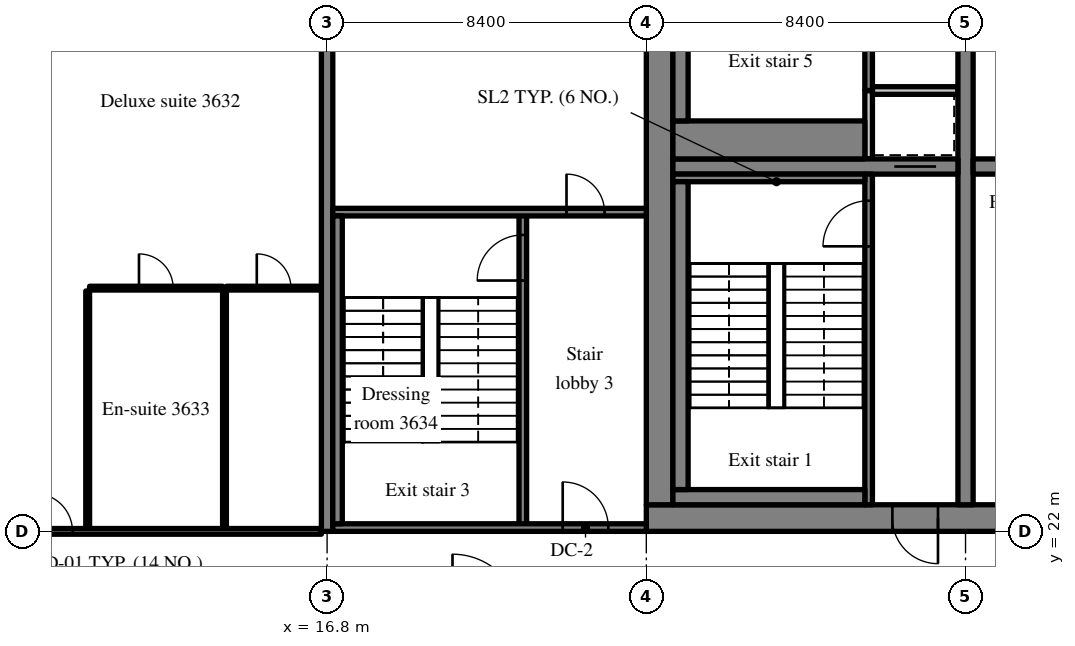
"""IFC4 building model, lengths in metres.
Left out: names, types, materials, properties, quantities, classifications, styles, units other than length and angle.
Written with IfcOpenShell. Run it as: python <this file> out.ifc"""

import sys

from ifc_helpers import new_model, si_unit, direction, frame, frame_2d, origin, place, context, subcontext, project, spatial, rectangle, extrude, source, transform, mapped, element, fill, save


model = new_model("IFC4")
c1 = context("Model", 3, precision=1e-05, world=origin(), true_north=direction((0.0, 1.0)))
c2 = subcontext(c1, "Body", "Model", "MODEL_VIEW")
j1 = project(units=[si_unit("LENGTHUNIT", "METRE"), si_unit("PLANEANGLEUNIT", "RADIAN")], contexts=[c1])
p1 = place(None, origin())
s1 = spatial("IfcSite", under=j1, at=p1, CompositionType="ELEMENT")
p2 = place(p1, origin())
s2 = spatial("IfcBuilding", under=s1, at=p2, CompositionType="ELEMENT")
p3 = place(p2, frame((0.0, 0.0, 151.6)))
s3 = spatial("IfcBuildingStorey", under=s2, at=p3, CompositionType="ELEMENT", Elevation=151.6)
m1 = source(origin(), c2, "Body", "SweptSolid", [
    extrude(rectangle(XDim=50.4, YDim=0.7, at=frame_2d((25.2, 0.0))), origin(), (0.0, 0.0, 1.0), 3.52),
])
p4 = place(p3, frame((25.2, 22.35, 0.0), z_axis=(0.0, 0.0, 1.0), x_axis=(1.0, 0.0, 0.0)))
e1 = element("IfcWall", 1, at=p4, inside=s3, PredefinedType="SHEAR", context=c2, shape_type="MappedRepresentation", body=[
    mapped(m1, transform((0.0, 0.0, 0.0), scale=1.0)),
])
m2 = source(origin(), c2, "Body", "SweptSolid", [
    extrude(rectangle(XDim=1.8, YDim=2.1, at=frame_2d((0.9, 1.05))), frame((0.0, 0.36, 0.0), z_axis=(0.0, -1.0, 0.0), x_axis=(1.0, 0.0, 0.0)), (0.0, 0.0, 1.0), 0.72),
])
p5 = place(p4, frame((15.9, 0.0, 0.0)))
e2 = element("IfcOpeningElement", 2, at=p5, cuts=e1, PredefinedType="OPENING", context=c2, shape_type="MappedRepresentation", body=[
    mapped(m2, transform((0.0, 0.0, 0.0), scale=1.0)),
])
m3 = source(origin(), c2, "Body", "SweptSolid", [
    extrude(rectangle(XDim=0.9, YDim=2.1, at=frame_2d((0.45, 1.05))), frame((0.0, 0.36, 0.0), z_axis=(0.0, -1.0, 0.0), x_axis=(1.0, 0.0, 0.0)), (0.0, 0.0, 1.0), 0.72),
])
p6 = place(p4, frame((21.5, 0.0, 0.0)))
e3 = element("IfcOpeningElement", 3, at=p6, cuts=e1, PredefinedType="OPENING", context=c2, shape_type="MappedRepresentation", body=[
    mapped(m3, transform((0.0, 0.0, 0.0), scale=1.0)),
])
p7 = place(p4, frame((32.7, 0.0, 0.0)))
e4 = element("IfcOpeningElement", 4, at=p7, cuts=e1, PredefinedType="OPENING", context=c2, shape_type="MappedRepresentation", body=[
    mapped(m2, transform((0.0, 0.0, 0.0), scale=1.0)),
])
m4 = source(origin(), c2, "Body", "SweptSolid", [
    extrude(rectangle(XDim=1.2, YDim=2.1, at=frame_2d((0.6, 1.05))), frame((0.0, 0.36, 0.0), z_axis=(0.0, -1.0, 0.0), x_axis=(1.0, 0.0, 0.0)), (0.0, 0.0, 1.0), 0.72),
])
p8 = place(p4, frame((6.475, 0.0, 0.0)))
e5 = element("IfcOpeningElement", 5, at=p8, cuts=e1, PredefinedType="OPENING", context=c2, shape_type="MappedRepresentation", body=[
    mapped(m4, transform((0.0, 0.0, 0.0), scale=1.0)),
])
p9 = place(p4, frame((47.875, 0.0, 0.0)))
e6 = element("IfcOpeningElement", 6, at=p9, cuts=e1, PredefinedType="OPENING", context=c2, shape_type="MappedRepresentation", body=[
    mapped(m4, transform((0.0, 0.0, 0.0), scale=1.0)),
])
m5 = source(origin(), c2, "Body", "SweptSolid", [
    extrude(rectangle(XDim=18.6, YDim=0.7, at=frame_2d((9.3, 0.0))), origin(), (0.0, 0.0, 1.0), 3.52),
])
p10 = place(p3, frame((25.55, 22.7, 0.0), z_axis=(0.0, 0.0, 1.0), x_axis=(0.0, 1.0, 0.0)))
e7 = element("IfcWall", 7, at=p10, inside=s3, PredefinedType="SHEAR", context=c2, shape_type="MappedRepresentation", body=[
    mapped(m5, transform((0.0, 0.0, 0.0), scale=1.0)),
])
m6 = source(origin(), c2, "Body", "SweptSolid", [
    extrude(rectangle(XDim=18.6, YDim=0.4, at=frame_2d((9.3, 0.0))), origin(), (0.0, 0.0, 1.0), 3.52),
])
p11 = place(p3, frame((33.6, 22.7, 0.0), z_axis=(0.0, 0.0, 1.0), x_axis=(0.0, 1.0, 0.0)))
e8 = element("IfcWall", 8, at=p11, inside=s3, PredefinedType="SHEAR", context=c2, shape_type="MappedRepresentation", body=[
    mapped(m6, transform((0.0, 0.0, 0.0), scale=1.0)),
])
m7 = source(origin(), c2, "Body", "SweptSolid", [
    extrude(rectangle(XDim=1.1, YDim=2.1, at=frame_2d((0.55, 1.05))), frame((0.0, 0.21, 0.0), z_axis=(0.0, -1.0, 0.0), x_axis=(1.0, 0.0, 0.0)), (0.0, 0.0, 1.0), 0.42),
])
p12 = place(p11, frame((12.75, 0.0, 0.0)))
e9 = element("IfcOpeningElement", 9, at=p12, cuts=e8, PredefinedType="OPENING", context=c2, shape_type="MappedRepresentation", body=[
    mapped(m7, transform((0.0, 0.0, 0.0), scale=1.0)),
])
m8 = source(origin(), c2, "Body", "SweptSolid", [
    extrude(rectangle(XDim=7.5, YDim=0.4, at=frame_2d((3.75, 0.0))), origin(), (0.0, 0.0, 1.0), 3.52),
])
p13 = place(p3, frame((25.9, 31.6, 0.0), z_axis=(0.0, 0.0, 1.0), x_axis=(1.0, 0.0, 0.0)))
e10 = element("IfcWall", 10, at=p13, inside=s3, PredefinedType="SHEAR", context=c2, shape_type="MappedRepresentation", body=[
    mapped(m8, transform((0.0, 0.0, 0.0), scale=1.0)),
])
p14 = place(p13, frame((5.825, 0.0, 0.0)))
e11 = element("IfcOpeningElement", 11, at=p14, cuts=e10, PredefinedType="OPENING", context=c2, shape_type="MappedRepresentation", body=[
    mapped(m7, transform((0.0, 0.0, 0.0), scale=1.0)),
])
m9 = source(origin(), c2, "Body", "SweptSolid", [
    extrude(rectangle(XDim=16.4, YDim=0.4, at=frame_2d((8.2, 0.0))), origin(), (0.0, 0.0, 1.0), 3.52),
])
p15 = place(p3, frame((33.8, 31.6, 0.0), z_axis=(0.0, 0.0, 1.0), x_axis=(1.0, 0.0, 0.0)))
e12 = element("IfcWall", 12, at=p15, inside=s3, PredefinedType="SHEAR", context=c2, shape_type="MappedRepresentation", body=[
    mapped(m9, transform((0.0, 0.0, 0.0), scale=1.0)),
])
m10 = source(origin(), c2, "Body", "SweptSolid", [
    extrude(rectangle(XDim=1.0, YDim=2.1, at=frame_2d((0.5, 1.05))), frame((0.0, 0.21, 0.0), z_axis=(0.0, -1.0, 0.0), x_axis=(1.0, 0.0, 0.0)), (0.0, 0.0, 1.0), 0.42),
])
p16 = place(p15, frame((14.8, 0.0, 0.0)))
e13 = element("IfcOpeningElement", 13, at=p16, cuts=e12, PredefinedType="OPENING", context=c2, shape_type="MappedRepresentation", body=[
    mapped(m10, transform((0.0, 0.0, 0.0), scale=1.0)),
])
m11 = source(origin(), c2, "Body", "SweptSolid", [
    extrude(rectangle(XDim=20.0, YDim=0.3, at=frame_2d((10.0, 0.0))), origin(), (0.0, 0.0, 1.0), 3.52),
])
p17 = place(p3, frame((16.8, 22.0, 0.0), z_axis=(0.0, 0.0, 1.0), x_axis=(0.0, 1.0, 0.0)))
e14 = element("IfcWall", 14, at=p17, inside=s3, PredefinedType="SHEAR", context=c2, shape_type="MappedRepresentation", body=[
    mapped(m11, transform((0.0, 0.0, 0.0), scale=1.0)),
])
m12 = source(origin(), c2, "Body", "SweptSolid", [
    extrude(rectangle(XDim=8.7, YDim=0.2, at=frame_2d((4.35, 0.0))), origin(), (0.0, 0.0, 1.0), 3.52),
])
p18 = place(p3, frame((31.05, 22.7, 0.0), z_axis=(0.0, 0.0, 1.0), x_axis=(0.0, 1.0, 0.0)))
e15 = element("IfcWall", 15, at=p18, inside=s3, PredefinedType="SOLIDWALL", context=c2, shape_type="MappedRepresentation", body=[
    mapped(m12, transform((0.0, 0.0, 0.0), scale=1.0)),
])
m13 = source(origin(), c2, "Body", "SweptSolid", [
    extrude(rectangle(XDim=1.2, YDim=2.1, at=frame_2d((0.6, 1.05))), frame((0.0, 0.11, 0.0), z_axis=(0.0, -1.0, 0.0), x_axis=(1.0, 0.0, 0.0)), (0.0, 0.0, 1.0), 0.22),
])
p19 = place(p18, frame((6.8, 0.0, 0.0)))
e16 = element("IfcOpeningElement", 16, at=p19, cuts=e15, PredefinedType="OPENING", context=c2, shape_type="MappedRepresentation", body=[
    mapped(m13, transform((0.0, 0.0, 0.0), scale=1.0)),
])
m14 = source(origin(), c2, "Body", "SweptSolid", [
    extrude(rectangle(XDim=1.8, YDim=0.2, at=frame_2d((0.9, 0.0))), origin(), (0.0, 0.0, 1.0), 3.52),
])
p20 = place(p3, frame((31.05, 31.8, 0.0), z_axis=(0.0, 0.0, 1.0), x_axis=(0.0, 1.0, 0.0)))
e17 = element("IfcWall", 17, at=p20, inside=s3, PredefinedType="SOLIDWALL", context=c2, shape_type="MappedRepresentation", body=[
    mapped(m14, transform((0.0, 0.0, 0.0), scale=1.0)),
])
m15 = source(origin(), c2, "Body", "SweptSolid", [
    extrude(rectangle(XDim=2.25, YDim=0.2, at=frame_2d((1.125, 0.0))), origin(), (0.0, 0.0, 1.0), 3.52),
])
p21 = place(p3, frame((31.15, 33.6, 0.0), z_axis=(0.0, 0.0, 1.0), x_axis=(1.0, 0.0, 0.0)))
e18 = element("IfcWall", 18, at=p21, inside=s3, PredefinedType="SOLIDWALL", context=c2, shape_type="MappedRepresentation", body=[
    mapped(m15, transform((0.0, 0.0, 0.0), scale=1.0)),
])
m16 = source(origin(), c2, "Body", "SweptSolid", [
    extrude(rectangle(XDim=7.7, YDim=0.2, at=frame_2d((3.85, 0.0))), origin(), (0.0, 0.0, 1.0), 3.52),
])
p22 = place(p3, frame((31.05, 33.6, 0.0), z_axis=(0.0, 0.0, 1.0), x_axis=(0.0, 1.0, 0.0)))
e19 = element("IfcWall", 19, at=p22, inside=s3, PredefinedType="SOLIDWALL", context=c2, shape_type="MappedRepresentation", body=[
    mapped(m16, transform((0.0, 0.0, 0.0), scale=1.0)),
])
m17 = source(origin(), c2, "Body", "SweptSolid", [
    extrude(rectangle(XDim=1.8, YDim=2.1, at=frame_2d((0.9, 1.05))), frame((0.0, 0.11, 0.0), z_axis=(0.0, -1.0, 0.0), x_axis=(1.0, 0.0, 0.0)), (0.0, 0.0, 1.0), 0.22),
])
p23 = place(p22, frame((5.3, 0.0, 0.0)))
e20 = element("IfcOpeningElement", 20, at=p23, cuts=e19, PredefinedType="OPENING", context=c2, shape_type="MappedRepresentation", body=[
    mapped(m17, transform((0.0, 0.0, 0.0), scale=1.0)),
])
m18 = source(origin(), c2, "Body", "SweptSolid", [
    extrude(rectangle(XDim=8.3, YDim=0.2, at=frame_2d((4.15, 0.0))), origin(), (0.0, 0.0, 1.0), 3.52),
])
p24 = place(p3, frame((21.95, 22.1, 0.0), z_axis=(0.0, 0.0, 1.0), x_axis=(0.0, 1.0, 0.0)))
e21 = element("IfcWall", 21, at=p24, inside=s3, PredefinedType="SOLIDWALL", context=c2, shape_type="MappedRepresentation", body=[
    mapped(m18, transform((0.0, 0.0, 0.0), scale=1.0)),
])
p25 = place(p24, frame((6.5, 0.0, 0.0)))
e22 = element("IfcOpeningElement", 22, at=p25, cuts=e21, PredefinedType="OPENING", context=c2, shape_type="MappedRepresentation", body=[
    mapped(m13, transform((0.0, 0.0, 0.0), scale=1.0)),
])
m19 = source(origin(), c2, "Body", "SweptSolid", [
    extrude(rectangle(XDim=8.25, YDim=0.2, at=frame_2d((4.125, 0.0))), origin(), (0.0, 0.0, 1.0), 3.52),
])
p26 = place(p3, frame((16.95, 22.1, 0.0), z_axis=(0.0, 0.0, 1.0), x_axis=(1.0, 0.0, 0.0)))
e23 = element("IfcWall", 23, at=p26, inside=s3, PredefinedType="SOLIDWALL", context=c2, shape_type="MappedRepresentation", body=[
    mapped(m19, transform((0.0, 0.0, 0.0), scale=1.0)),
])
p27 = place(p26, frame((6.05, 0.0, 0.0)))
e24 = element("IfcOpeningElement", 24, at=p27, cuts=e23, PredefinedType="OPENING", context=c2, shape_type="MappedRepresentation", body=[
    mapped(m13, transform((0.0, 0.0, 0.0), scale=1.0)),
])
p28 = place(p3, frame((16.95, 30.4, 0.0), z_axis=(0.0, 0.0, 1.0), x_axis=(1.0, 0.0, 0.0)))
e25 = element("IfcWall", 25, at=p28, inside=s3, PredefinedType="SOLIDWALL", context=c2, shape_type="MappedRepresentation", body=[
    mapped(m19, transform((0.0, 0.0, 0.0), scale=1.0)),
])
m20 = source(origin(), c2, "Body", "SweptSolid", [
    extrude(rectangle(XDim=1.0, YDim=2.1, at=frame_2d((0.5, 1.05))), frame((0.0, 0.11, 0.0), z_axis=(0.0, -1.0, 0.0), x_axis=(1.0, 0.0, 0.0)), (0.0, 0.0, 1.0), 0.22),
])
p29 = place(p28, frame((6.15, 0.0, 0.0)))
e26 = element("IfcOpeningElement", 26, at=p29, cuts=e25, PredefinedType="OPENING", context=c2, shape_type="MappedRepresentation", body=[
    mapped(m20, transform((0.0, 0.0, 0.0), scale=1.0)),
])
m21 = source(origin(), c2, "Body", "SweptSolid", [
    extrude(rectangle(XDim=5.05, YDim=0.4, at=frame_2d((2.525, 0.0))), origin(), (0.0, 0.0, 1.0), 3.52),
])
p30 = place(p3, frame((25.9, 22.9, 0.0), z_axis=(0.0, 0.0, 1.0), x_axis=(1.0, 0.0, 0.0)))
e27 = element("IfcWall", 27, at=p30, inside=s3, PredefinedType="SOLIDWALL", context=c2, shape_type="MappedRepresentation", body=[
    mapped(m21, transform((0.0, 0.0, 0.0), scale=1.0)),
])
m22 = source(origin(), c2, "Body", "SweptSolid", [
    extrude(rectangle(XDim=5.05, YDim=0.2, at=frame_2d((2.525, 0.0))), origin(), (0.0, 0.0, 1.0), 3.52),
])
p31 = place(p3, frame((25.9, 31.3, 0.0), z_axis=(0.0, 0.0, 1.0), x_axis=(1.0, 0.0, 0.0)))
e28 = element("IfcWall", 28, at=p31, inside=s3, PredefinedType="SOLIDWALL", context=c2, shape_type="MappedRepresentation", body=[
    mapped(m22, transform((0.0, 0.0, 0.0), scale=1.0)),
])
m23 = source(origin(), c2, "Body", "SweptSolid", [
    extrude(rectangle(XDim=8.1, YDim=0.4, at=frame_2d((4.05, 0.0))), origin(), (0.0, 0.0, 1.0), 3.52),
])
p32 = place(p3, frame((26.1, 23.1, 0.0), z_axis=(0.0, 0.0, 1.0), x_axis=(0.0, 1.0, 0.0)))
e29 = element("IfcWall", 29, at=p32, inside=s3, PredefinedType="SOLIDWALL", context=c2, shape_type="MappedRepresentation", body=[
    mapped(m23, transform((0.0, 0.0, 0.0), scale=1.0)),
])
m24 = source(origin(), c2, "Body", "SweptSolid", [
    extrude(rectangle(XDim=8.1, YDim=0.25, at=frame_2d((4.05, 0.0))), origin(), (0.0, 0.0, 1.0), 3.52),
])
p33 = place(p3, frame((17.075, 22.2, 0.0), z_axis=(0.0, 0.0, 1.0), x_axis=(0.0, 1.0, 0.0)))
e30 = element("IfcWall", 30, at=p33, inside=s3, PredefinedType="SOLIDWALL", context=c2, shape_type="MappedRepresentation", body=[
    mapped(m24, transform((0.0, 0.0, 0.0), scale=1.0)),
])
m25 = source(origin(), c2, "Body", "SweptSolid", [
    extrude(rectangle(XDim=5.05, YDim=1.0, at=frame_2d((2.525, 0.0))), origin(), (0.0, 0.0, 1.0), 3.52),
])
p34 = place(p3, frame((25.9, 32.3, 0.0), z_axis=(0.0, 0.0, 1.0), x_axis=(1.0, 0.0, 0.0)))
e31 = element("IfcWall", 31, at=p34, inside=s3, PredefinedType="SOLIDWALL", context=c2, shape_type="MappedRepresentation", body=[
    mapped(m25, transform((0.0, 0.0, 0.0), scale=1.0)),
])
p35 = place(p3, frame((26.1, 32.8, 0.0), z_axis=(0.0, 0.0, 1.0), x_axis=(0.0, 1.0, 0.0)))
e32 = element("IfcWall", 32, at=p35, inside=s3, PredefinedType="SOLIDWALL", context=c2, shape_type="MappedRepresentation", body=[
    mapped(m23, transform((0.0, 0.0, 0.0), scale=1.0)),
])
m26 = source(origin(), c2, "Body", "SweptSolid", [
    extrude(rectangle(XDim=6.25, YDim=0.1, at=frame_2d((3.125, 0.0))), origin(), (0.0, 0.0, 1.0), 3.52),
])
for number, where, z_axis, x_axis in (
    (33, (10.5, 22.075, 0.0), (0.0, 0.0, 1.0), (0.0, 1.0, 0.0)),
    (34, (14.1, 22.075, 0.0), (0.0, 0.0, 1.0), (0.0, 1.0, 0.0)),
):
    element("IfcWall", number, at=place(p3, frame(where, z_axis=z_axis, x_axis=x_axis)), inside=s3, PredefinedType="PARTITIONING", context=c2, shape_type="MappedRepresentation", body=[
        mapped(m26, transform((0.0, 0.0, 0.0), scale=1.0)),
    ])
m27 = source(origin(), c2, "Body", "SweptSolid", [
    extrude(rectangle(XDim=3.5, YDim=0.1, at=frame_2d((1.75, 0.0))), origin(), (0.0, 0.0, 1.0), 3.52),
])
p36 = place(p3, frame((10.55, 28.4, 0.0), z_axis=(0.0, 0.0, 1.0), x_axis=(1.0, 0.0, 0.0)))
e35 = element("IfcWall", 35, at=p36, inside=s3, PredefinedType="PARTITIONING", context=c2, shape_type="MappedRepresentation", body=[
    mapped(m27, transform((0.0, 0.0, 0.0), scale=1.0)),
])
m28 = source(origin(), c2, "Body", "SweptSolid", [
    extrude(rectangle(XDim=0.9, YDim=2.1, at=frame_2d((0.45, 1.05))), frame((0.0, 0.06, 0.0), z_axis=(0.0, -1.0, 0.0), x_axis=(1.0, 0.0, 0.0)), (0.0, 0.0, 1.0), 0.12),
])
p37 = place(p36, frame((1.3, 0.0, 0.0)))
e36 = element("IfcOpeningElement", 36, at=p37, cuts=e35, PredefinedType="OPENING", context=c2, shape_type="MappedRepresentation", body=[
    mapped(m28, transform((0.0, 0.0, 0.0), scale=1.0)),
])
m29 = source(origin(), c2, "Body", "SweptSolid", [
    extrude(rectangle(XDim=2.5, YDim=0.1, at=frame_2d((1.25, 0.0))), origin(), (0.0, 0.0, 1.0), 3.52),
])
p38 = place(p3, frame((14.15, 28.4, 0.0), z_axis=(0.0, 0.0, 1.0), x_axis=(1.0, 0.0, 0.0)))
e37 = element("IfcWall", 37, at=p38, inside=s3, PredefinedType="PARTITIONING", context=c2, shape_type="MappedRepresentation", body=[
    mapped(m29, transform((0.0, 0.0, 0.0), scale=1.0)),
])
p39 = place(p38, frame((0.8, 0.0, 0.0)))
e38 = element("IfcOpeningElement", 38, at=p39, cuts=e37, PredefinedType="OPENING", context=c2, shape_type="MappedRepresentation", body=[
    mapped(m28, transform((0.0, 0.0, 0.0), scale=1.0)),
])
m30 = source(origin(), c2, "Body", "SweptSolid", [
    extrude(rectangle(XDim=7.95, YDim=0.15, at=frame_2d((3.975, 0.0))), origin(), (0.0, 0.0, 1.0), 2.82),
])
p40 = place(p3, frame((8.7, 22.0, 0.0), z_axis=(0.0, 0.0, 1.0), x_axis=(1.0, 0.0, 0.0)))
e39 = element("IfcWall", 39, at=p40, inside=s3, PredefinedType="PARTITIONING", context=c2, shape_type="MappedRepresentation", body=[
    mapped(m30, transform((0.0, 0.0, 0.0), scale=1.0)),
])
m31 = source(origin(), c2, "Body", "SweptSolid", [
    extrude(rectangle(XDim=1.0, YDim=2.1, at=frame_2d((0.5, 1.05))), frame((0.0, 0.085, 0.0), z_axis=(0.0, -1.0, 0.0), x_axis=(1.0, 0.0, 0.0)), (0.0, 0.0, 1.0), 0.17),
])
p41 = place(p40, frame((0.4, 0.0, 0.0)))
e40 = element("IfcOpeningElement", 40, at=p41, cuts=e39, PredefinedType="OPENING", context=c2, shape_type="MappedRepresentation", body=[
    mapped(m31, transform((0.0, 0.0, 0.0), scale=1.0)),
])
m32 = source(origin(), c2, "Body", "SweptSolid", [
    extrude(rectangle(XDim=1.2, YDim=2.1, at=frame_2d((0.6, 1.05))), frame((0.0, 0.025, 0.0), z_axis=(0.0, -1.0, 0.0), x_axis=(1.0, 0.0, 0.0)), (0.0, 0.0, 1.0), 0.05),
])
p42 = place(p19, origin())
e41 = element("IfcDoor", 41, at=p42, inside=s3, OperationType="SINGLE_SWING_LEFT", PredefinedType="DOOR", context=c2, shape_type="MappedRepresentation", body=[
    mapped(m32, transform((0.0, 0.0, 0.0), scale=1.0)),
])
fill(e16, e41)
m33 = source(origin(), c2, "Body", "SweptSolid", [
    extrude(rectangle(XDim=1.2, YDim=2.1, at=frame_2d((0.6, 1.05))), frame((0.0, 0.275, 0.0), z_axis=(0.0, -1.0, 0.0), x_axis=(1.0, 0.0, 0.0)), (0.0, 0.0, 1.0), 0.05),
])
p43 = place(p8, origin())
e42 = element("IfcDoor", 42, at=p43, inside=s3, OperationType="SINGLE_SWING_RIGHT", PredefinedType="DOOR", context=c2, shape_type="MappedRepresentation", body=[
    mapped(m33, transform((0.0, 0.0, 0.0), scale=1.0)),
])
fill(e5, e42)
m34 = source(origin(), c2, "Body", "SweptSolid", [
    extrude(rectangle(XDim=1.1, YDim=2.1, at=frame_2d((0.55, 1.05))), frame((0.0, 0.025, 0.0), z_axis=(0.0, -1.0, 0.0), x_axis=(1.0, 0.0, 0.0)), (0.0, 0.0, 1.0), 0.05),
])
p44 = place(p14, origin())
e43 = element("IfcDoor", 43, at=p44, inside=s3, OperationType="SLIDING_TO_RIGHT", PredefinedType="DOOR", context=c2, shape_type="MappedRepresentation", body=[
    mapped(m34, transform((0.0, 0.0, 0.0), scale=1.0)),
])
fill(e11, e43)
p45 = place(p25, origin())
e44 = element("IfcDoor", 44, at=p45, inside=s3, OperationType="SINGLE_SWING_LEFT", PredefinedType="DOOR", context=c2, shape_type="MappedRepresentation", body=[
    mapped(m32, transform((0.0, 0.0, 0.0), scale=1.0)),
])
fill(e22, e44)
p46 = place(p27, origin())
e45 = element("IfcDoor", 45, at=p46, inside=s3, OperationType="SINGLE_SWING_LEFT", PredefinedType="DOOR", context=c2, shape_type="MappedRepresentation", body=[
    mapped(m32, transform((0.0, 0.0, 0.0), scale=1.0)),
])
fill(e24, e45)
m35 = source(origin(), c2, "Body", "SweptSolid", [
    extrude(rectangle(XDim=1.0, YDim=2.1, at=frame_2d((0.5, 1.05))), frame((0.0, 0.025, 0.0), z_axis=(0.0, -1.0, 0.0), x_axis=(1.0, 0.0, 0.0)), (0.0, 0.0, 1.0), 0.05),
])
p47 = place(p29, origin())
e46 = element("IfcDoor", 46, at=p47, inside=s3, OperationType="SINGLE_SWING_LEFT", PredefinedType="DOOR", context=c2, shape_type="MappedRepresentation", body=[
    mapped(m35, transform((0.0, 0.0, 0.0), scale=1.0)),
])
fill(e26, e46)
m36 = source(origin(), c2, "Body", "SweptSolid", [
    extrude(rectangle(XDim=0.9, YDim=2.1, at=frame_2d((0.45, 1.05))), frame((0.0, 0.025, 0.0), z_axis=(0.0, -1.0, 0.0), x_axis=(1.0, 0.0, 0.0)), (0.0, 0.0, 1.0), 0.05),
])
p48 = place(p37, origin())
e47 = element("IfcDoor", 47, at=p48, inside=s3, OperationType="SINGLE_SWING_LEFT", PredefinedType="DOOR", context=c2, shape_type="MappedRepresentation", body=[
    mapped(m36, transform((0.0, 0.0, 0.0), scale=1.0)),
])
fill(e36, e47)
p49 = place(p39, origin())
e48 = element("IfcDoor", 48, at=p49, inside=s3, OperationType="SINGLE_SWING_LEFT", PredefinedType="DOOR", context=c2, shape_type="MappedRepresentation", body=[
    mapped(m36, transform((0.0, 0.0, 0.0), scale=1.0)),
])
fill(e38, e48)
p50 = place(p41, origin())
e49 = element("IfcDoor", 49, at=p50, inside=s3, OperationType="SINGLE_SWING_LEFT", PredefinedType="DOOR", context=c2, shape_type="MappedRepresentation", body=[
    mapped(m35, transform((0.0, 0.0, 0.0), scale=1.0)),
])
fill(e40, e49)
save(model, sys.argv[1])
